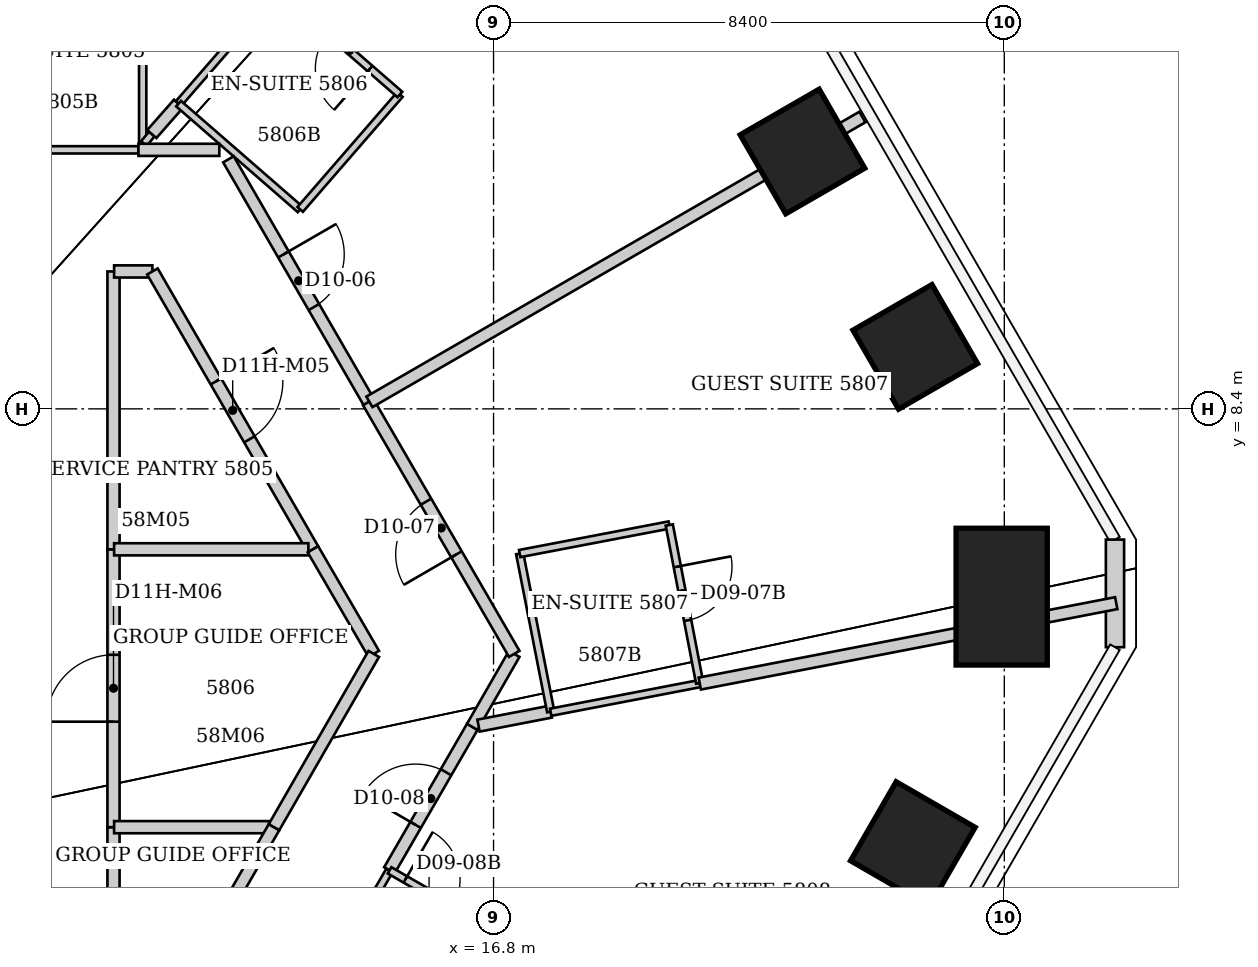
"""IFC4 building model, lengths in metres.
Left out: names, types, materials, properties, quantities, classifications, styles, units other than length and angle.
Written with IfcOpenShell. Run it as: python <this file> out.ifc"""

import sys

from ifc_helpers import new_model, si_unit, direction, frame, frame_2d, origin, origin_2d, place, context, subcontext, project, spatial, rectangle, extrude, element, fill, save


model = new_model("IFC4")
c1 = context("Model", 3, precision=1e-05, world=origin(), true_north=direction((0.0, 1.0)))
c2 = subcontext(c1, "Body", "Model", "MODEL_VIEW")
j1 = project(units=[si_unit("LENGTHUNIT", "METRE"), si_unit("PLANEANGLEUNIT", "RADIAN")], contexts=[c1])
p1 = place(None, origin())
s1 = spatial("IfcSite", under=j1, at=p1, CompositionType="ELEMENT")
p2 = place(p1, origin())
s2 = spatial("IfcBuilding", under=s1, at=p2, CompositionType="ELEMENT")
p3 = place(p2, frame((0.0, 0.0, 232.6)))
s3 = spatial("IfcBuildingStorey", under=s2, at=p3, CompositionType="ELEMENT", Elevation=232.6)
p4 = place(p3, frame((21.88, 12.633, -0.051), z_axis=(-0.059073478929, -0.034090583664, 0.99767136683), x_axis=(0.86410694155, 0.498665569053, 0.068204426596)))
e1 = element("IfcColumn", 1, at=p4, inside=s3, PredefinedType="COLUMN", context=c2, shape_type="SweptSolid", body=[
    extrude(rectangle(XDim=1.5, YDim=1.5, at=origin_2d()), origin(), (0.0, 0.0, 1.0), 3.86),
])
p5 = place(p3, frame((23.735, 9.419, -0.059), z_axis=(-0.064004664797, -0.025374630423, 0.997626949824), x_axis=(0.863841955807, 0.499136409128, 0.068116961699)))
e2 = element("IfcColumn", 2, at=p5, inside=s3, PredefinedType="COLUMN", context=c2, shape_type="SweptSolid", body=[
    extrude(rectangle(XDim=1.5, YDim=1.5, at=origin_2d()), origin(), (0.0, 0.0, 1.0), 3.868),
])
p6 = place(p3, frame((25.156, 5.311, -0.069), z_axis=(-0.069494626315, -0.014666891242, 0.997474500534), x_axis=(0.997582322762, -0.001100831088, 0.069485951703)))
e3 = element("IfcColumn", 3, at=p6, inside=s3, PredefinedType="COLUMN", context=c2, shape_type="SweptSolid", body=[
    extrude(rectangle(XDim=1.5, YDim=2.25, at=origin_2d()), origin(), (0.0, 0.0, 1.0), 3.878),
])
p7 = place(p3, frame((23.696, 1.242, -0.068), z_axis=(-0.064946488334, -0.003401658943, 0.997882950235), x_axis=(0.86374544839, -0.500971680077, 0.05450849609)))
e4 = element("IfcColumn", 4, at=p7, inside=s3, PredefinedType="COLUMN", context=c2, shape_type="SweptSolid", body=[
    extrude(rectangle(XDim=1.5, YDim=1.5, at=origin_2d()), origin(), (0.0, 0.0, 1.0), 3.876),
])
p8 = place(p3, frame((27.02, 6.25, 0.0), z_axis=(0.0, 0.0, 1.0), x_axis=(0.0, -1.0, 0.0)))
e5 = element("IfcWall", 5, at=p8, inside=s3, PredefinedType="SOLIDWALL", context=c2, shape_type="SweptSolid", body=[
    extrude(rectangle(XDim=1.77, YDim=0.3, at=frame_2d((0.885, 0.0))), origin(), (0.0, 0.0, 1.0), 3.64),
])
p9 = place(p3, frame((10.55, -2.855, 0.0), z_axis=(0.0, 0.0, 1.0), x_axis=(0.0, 1.0, 0.0)))
e6 = element("IfcWall", 6, at=p9, inside=s3, PredefinedType="PARTITIONING", context=c2, shape_type="SweptSolid", body=[
    extrude(rectangle(XDim=4.375, YDim=0.2, at=frame_2d((2.188, 0.0))), origin(), (0.0, 0.0, 1.0), 3.64),
])
p10 = place(p3, frame((10.55, 1.52, 0.0), z_axis=(0.0, 0.0, 1.0), x_axis=(0.0, 1.0, 0.0)))
e7 = element("IfcWall", 7, at=p10, inside=s3, PredefinedType="PARTITIONING", context=c2, shape_type="SweptSolid", body=[
    extrude(rectangle(XDim=4.57, YDim=0.2, at=frame_2d((2.285, 0.0))), origin(), (0.0, 0.0, 1.0), 3.64),
])
p11 = place(p10, frame((1.735, 0.0, 0.0)))
e8 = element("IfcOpeningElement", 8, at=p11, cuts=e7, PredefinedType="OPENING", context=c2, shape_type="SweptSolid", body=[
    extrude(rectangle(XDim=1.1, YDim=2.2, at=frame_2d((0.55, 1.1))), frame((0.0, 0.1, 0.0), z_axis=(0.0, -1.0, 0.0), x_axis=(1.0, 0.0, 0.0)), (0.0, 0.0, 1.0), 0.2),
])
p12 = place(p3, frame((10.55, 6.09, 0.0), z_axis=(0.0, 0.0, 1.0), x_axis=(0.0, 1.0, 0.0)))
e9 = element("IfcWall", 9, at=p12, inside=s3, PredefinedType="PARTITIONING", context=c2, shape_type="SweptSolid", body=[
    extrude(rectangle(XDim=4.57, YDim=0.2, at=frame_2d((2.285, 0.0))), origin(), (0.0, 0.0, 1.0), 3.64),
])
p13 = place(p3, frame((10.56, 1.52, 0.0), z_axis=(0.0, 0.0, 1.0), x_axis=(1.0, 0.0, 0.0)))
e10 = element("IfcWall", 10, at=p13, inside=s3, PredefinedType="PARTITIONING", context=c2, shape_type="SweptSolid", body=[
    extrude(rectangle(XDim=2.55, YDim=0.2, at=frame_2d((1.275, 0.0))), origin(), (0.0, 0.0, 1.0), 3.64),
])
p14 = place(p3, frame((10.56, 10.66, 0.0), z_axis=(0.0, 0.0, 1.0), x_axis=(1.0, 0.0, 0.0)))
e11 = element("IfcWall", 11, at=p14, inside=s3, PredefinedType="PARTITIONING", context=c2, shape_type="SweptSolid", body=[
    extrude(rectangle(XDim=0.63, YDim=0.2, at=frame_2d((0.315, 0.0))), origin(), (0.0, 0.0, 1.0), 3.64),
])
p15 = place(p3, frame((10.96, 12.66, 0.0), z_axis=(0.0, 0.0, 1.0), x_axis=(-1.0, 0.0, 0.0)))
e12 = element("IfcWall", 12, at=p15, inside=s3, PredefinedType="PARTITIONING", context=c2, shape_type="SweptSolid", body=[
    extrude(rectangle(XDim=2.43, YDim=0.12, at=frame_2d((1.215, 0.0))), origin(), (0.0, 0.0, 1.0), 3.64),
])
p16 = place(p3, frame((11.03, 12.74, 0.0), z_axis=(0.0, 0.0, 1.0), x_axis=(0.0, 1.0, 0.0)))
e13 = element("IfcWall", 13, at=p16, inside=s3, PredefinedType="PARTITIONING", context=c2, shape_type="SweptSolid", body=[
    extrude(rectangle(XDim=2.59, YDim=0.12, at=frame_2d((1.295, 0.0))), origin(), (0.0, 0.0, 1.0), 3.038),
])
p17 = place(p3, frame((11.049, 12.763, 0.0), z_axis=(0.0, 0.0, 1.0), x_axis=(0.639596257895, 0.768711016499, 0.0)))
e14 = element("IfcWall", 14, at=p17, inside=s3, PredefinedType="PARTITIONING", context=c2, shape_type="SweptSolid", body=[
    extrude(rectangle(XDim=0.204, YDim=0.12, at=frame_2d((0.102, 0.0))), origin(), (0.0, 0.0, 1.0), 3.64),
])
p18 = place(p3, frame((11.18, 12.92, 0.0), z_axis=(0.0, 0.0, 1.0), x_axis=(0.660578310858, 0.750757147967, 0.0)))
e15 = element("IfcWall", 15, at=p18, inside=s3, PredefinedType="PARTITIONING", context=c2, shape_type="SweptSolid", body=[
    extrude(rectangle(XDim=0.666, YDim=0.2, at=frame_2d((0.333, 0.0))), origin(), (0.0, 0.0, 1.0), 3.64),
])
p19 = place(p3, frame((11.19, 10.66, 0.0), z_axis=(0.0, 0.0, 1.0), x_axis=(0.500248310865, -0.865881993967, 0.0)))
e16 = element("IfcWall", 16, at=p19, inside=s3, PredefinedType="PARTITIONING", context=c2, shape_type="SweptSolid", body=[
    extrude(rectangle(XDim=5.278, YDim=0.2, at=frame_2d((2.639, 0.0))), origin(), (0.0, 0.0, 1.0), 3.64),
])
p20 = place(p19, frame((2.089, 0.0, 0.0)))
e17 = element("IfcOpeningElement", 17, at=p20, cuts=e16, PredefinedType="OPENING", context=c2, shape_type="SweptSolid", body=[
    extrude(rectangle(XDim=1.1, YDim=2.2, at=frame_2d((0.55, 1.1))), frame((0.0, 0.1, 0.0), z_axis=(0.0, -1.0, 0.0), x_axis=(1.0, 0.0, 0.0)), (0.0, 0.0, 1.0), 0.2),
])
p21 = place(p3, frame((11.62, 13.42, 0.0), z_axis=(0.0, 0.0, 1.0), x_axis=(0.655335308977, 0.755338091723, 0.0)))
e18 = element("IfcWall", 18, at=p21, inside=s3, PredefinedType="PARTITIONING", context=c2, shape_type="SweptSolid", body=[
    extrude(rectangle(XDim=2.502, YDim=0.12, at=frame_2d((1.251, 0.0))), origin(), (0.0, 0.0, 1.0), 3.64),
])
p22 = place(p3, frame((11.62, 13.42, 0.0), z_axis=(0.0, 0.0, 1.0), x_axis=(0.754444902764, -0.656363381591, 0.0)))
e19 = element("IfcWall", 19, at=p22, inside=s3, PredefinedType="PARTITIONING", context=c2, shape_type="SweptSolid", body=[
    extrude(rectangle(XDim=2.651, YDim=0.12, at=frame_2d((1.325, 0.0))), origin(), (0.0, 0.0, 1.0), 3.64),
])
p23 = place(p3, frame((12.29, 12.66, 0.0), z_axis=(0.0, 0.0, 1.0), x_axis=(-1.0, 0.0, 0.0)))
e20 = element("IfcWall", 20, at=p23, inside=s3, PredefinedType="PARTITIONING", context=c2, shape_type="SweptSolid", body=[
    extrude(rectangle(XDim=1.33, YDim=0.2, at=frame_2d((0.665, 0.0))), origin(), (0.0, 0.0, 1.0), 3.64),
])
p24 = place(p3, frame((12.44, 12.504, 0.0), z_axis=(0.0, 0.0, 1.0), x_axis=(0.500616963614, -0.865668906535, 0.0)))
e21 = element("IfcWall", 21, at=p24, inside=s3, PredefinedType="PARTITIONING", context=c2, shape_type="SweptSolid", body=[
    extrude(rectangle(XDim=4.614, YDim=0.2, at=frame_2d((2.307, 0.0))), origin(), (0.0, 0.0, 1.0), 3.64),
])
p25 = place(p24, frame((1.807, 0.0, 0.0)))
e22 = element("IfcOpeningElement", 22, at=p25, cuts=e21, PredefinedType="OPENING", context=c2, shape_type="SweptSolid", body=[
    extrude(rectangle(XDim=1.0, YDim=2.13, at=frame_2d((0.5, 1.065))), frame((0.0, 0.1, 0.0), z_axis=(0.0, -1.0, 0.0), x_axis=(1.0, 0.0, 0.0)), (0.0, 0.0, 1.0), 0.2),
])
p26 = place(p3, frame((13.19, 1.52, 0.0), z_axis=(0.0, 0.0, 1.0), x_axis=(-0.500193590286, -0.865913605527, 0.0)))
e23 = element("IfcWall", 23, at=p26, inside=s3, PredefinedType="PARTITIONING", context=c2, shape_type="SweptSolid", body=[
    extrude(rectangle(XDim=5.278, YDim=0.2, at=frame_2d((2.639, 0.0))), origin(), (0.0, 0.0, 1.0), 3.64),
])
p27 = place(p26, frame((1.9, 0.0, 0.0)))
e24 = element("IfcOpeningElement", 24, at=p27, cuts=e23, PredefinedType="OPENING", context=c2, shape_type="SweptSolid", body=[
    extrude(rectangle(XDim=1.1, YDim=2.2, at=frame_2d((0.55, 1.1))), frame((0.0, 0.1, 0.0), z_axis=(0.0, -1.0, 0.0), x_axis=(1.0, 0.0, 0.0)), (0.0, 0.0, 1.0), 0.2),
])
p28 = place(p3, frame((13.62, 11.68, 0.0), z_axis=(0.0, 0.0, 1.0), x_axis=(0.655335308977, 0.755338091723, 0.0)))
e25 = element("IfcWall", 25, at=p28, inside=s3, PredefinedType="PARTITIONING", context=c2, shape_type="SweptSolid", body=[
    extrude(rectangle(XDim=2.502, YDim=0.12, at=frame_2d((1.251, 0.0))), origin(), (0.0, 0.0, 1.0), 3.64),
])
p29 = place(p3, frame((13.755, 6.09, 0.0), z_axis=(0.0, 0.0, 1.0), x_axis=(-1.0, 0.0, 0.0)))
e26 = element("IfcWall", 26, at=p29, inside=s3, PredefinedType="PARTITIONING", context=c2, shape_type="SweptSolid", body=[
    extrude(rectangle(XDim=3.195, YDim=0.2, at=frame_2d((1.597, 0.0))), origin(), (0.0, 0.0, 1.0), 3.64),
])
p30 = place(p3, frame((13.83, 6.09, 0.0), z_axis=(0.0, 0.0, 1.0), x_axis=(0.502573539539, -0.864534462792, 0.0)))
e27 = element("IfcWall", 27, at=p30, inside=s3, PredefinedType="PARTITIONING", context=c2, shape_type="SweptSolid", body=[
    extrude(rectangle(XDim=1.99, YDim=0.2, at=frame_2d((0.995, 0.0))), origin(), (0.0, 0.0, 1.0), 3.64),
])
p31 = place(p3, frame((13.86, -1.31, 0.0), z_axis=(0.0, 0.0, 1.0), x_axis=(0.501813488763, 0.864975850817, 0.0)))
e28 = element("IfcWall", 28, at=p31, inside=s3, PredefinedType="PARTITIONING", context=c2, shape_type="SweptSolid", body=[
    extrude(rectangle(XDim=2.451, YDim=0.12, at=frame_2d((1.226, 0.0))), origin(), (0.0, 0.0, 1.0), 3.64),
])
p32 = place(p3, frame((14.83, 4.37, 0.0), z_axis=(0.0, 0.0, 1.0), x_axis=(-0.498775186059, -0.866731396554, 0.0)))
e29 = element("IfcWall", 29, at=p32, inside=s3, PredefinedType="PARTITIONING", context=c2, shape_type="SweptSolid", body=[
    extrude(rectangle(XDim=3.288, YDim=0.2, at=frame_2d((1.644, 0.0))), origin(), (0.0, 0.0, 1.0), 3.64),
])
p33 = place(p3, frame((15.088, 0.811, 0.0), z_axis=(0.0, 0.0, 1.0), x_axis=(0.500149166734, 0.8659392652, 0.0)))
e30 = element("IfcWall", 30, at=p33, inside=s3, PredefinedType="PARTITIONING", context=c2, shape_type="SweptSolid", body=[
    extrude(rectangle(XDim=2.724, YDim=0.2, at=frame_2d((1.362, 0.0))), origin(), (0.0, 0.0, 1.0), 3.64),
])
p34 = place(p33, frame((0.862, 0.0, 0.0)))
e31 = element("IfcOpeningElement", 31, at=p34, cuts=e30, PredefinedType="OPENING", context=c2, shape_type="SweptSolid", body=[
    extrude(rectangle(XDim=1.0, YDim=2.13, at=frame_2d((0.5, 1.065))), frame((0.0, 0.1, 0.0), z_axis=(0.0, -1.0, 0.0), x_axis=(1.0, 0.0, 0.0)), (0.0, 0.0, 1.0), 0.2),
])
p35 = place(p3, frame((15.26, 13.57, 0.0), z_axis=(0.0, 0.0, 1.0), x_axis=(-0.754444902764, 0.656363381591, 0.0)))
e32 = element("IfcWall", 32, at=p35, inside=s3, PredefinedType="PARTITIONING", context=c2, shape_type="SweptSolid", body=[
    extrude(rectangle(XDim=2.651, YDim=0.12, at=frame_2d((1.325, 0.0))), origin(), (0.0, 0.0, 1.0), 3.64),
])
p36 = place(p35, frame((0.65, 0.0, 0.0)))
e33 = element("IfcOpeningElement", 33, at=p36, cuts=e32, PredefinedType="OPENING", context=c2, shape_type="SweptSolid", body=[
    extrude(rectangle(XDim=0.9, YDim=2.03, at=frame_2d((0.45, 1.015))), frame((0.0, 0.06, 0.0), z_axis=(0.0, -1.0, 0.0), x_axis=(1.0, 0.0, 0.0)), (0.0, 0.0, 1.0), 0.12),
])
p37 = place(p3, frame((16.45, 3.17, 0.0), z_axis=(0.0, 0.0, 1.0), x_axis=(0.49845455473, 0.866915830325, 0.0)))
e34 = element("IfcWall", 34, at=p37, inside=s3, PredefinedType="PARTITIONING", context=c2, shape_type="SweptSolid", body=[
    extrude(rectangle(XDim=1.384, YDim=0.2, at=frame_2d((0.692, 0.0))), origin(), (0.0, 0.0, 1.0), 3.64),
])
p38 = place(p3, frame((16.553, 3.19, 0.0), z_axis=(0.0, 0.0, 1.0), x_axis=(0.981743377248, 0.19021025532, 0.0)))
e35 = element("IfcWall", 35, at=p38, inside=s3, PredefinedType="PARTITIONING", context=c2, shape_type="SweptSolid", body=[
    extrude(rectangle(XDim=1.209, YDim=0.2, at=frame_2d((0.604, 0.0))), origin(), (0.0, 0.0, 1.0), 3.64),
])
p39 = place(p3, frame((17.14, 4.37, 0.0), z_axis=(0.0, 0.0, 1.0), x_axis=(-0.501524901322, 0.865143209737, 0.0)))
e36 = element("IfcWall", 36, at=p39, inside=s3, PredefinedType="PARTITIONING", context=c2, shape_type="SweptSolid", body=[
    extrude(rectangle(XDim=4.785, YDim=0.2, at=frame_2d((2.393, 0.0))), origin(), (0.0, 0.0, 1.0), 3.64),
])
p40 = place(p39, frame((1.893, 0.0, 0.0)))
e37 = element("IfcOpeningElement", 37, at=p40, cuts=e36, PredefinedType="OPENING", context=c2, shape_type="SweptSolid", body=[
    extrude(rectangle(XDim=1.0, YDim=2.13, at=frame_2d((0.5, 1.065))), frame((0.0, 0.1, 0.0), z_axis=(0.0, -1.0, 0.0), x_axis=(1.0, 0.0, 0.0)), (0.0, 0.0, 1.0), 0.2),
])
p41 = place(p3, frame((17.23, 6.02, 0.0), z_axis=(0.0, 0.0, 1.0), x_axis=(0.192499717639, -0.981297028788, 0.0)))
e38 = element("IfcWall", 38, at=p41, inside=s3, PredefinedType="PARTITIONING", context=c2, shape_type="SweptSolid", body=[
    extrude(rectangle(XDim=2.649, YDim=0.12, at=frame_2d((1.325, 0.0))), origin(), (0.0, 0.0, 1.0), 3.64),
])
p42 = place(p3, frame((17.4, -0.52, 0.0), z_axis=(0.0, 0.0, 1.0), x_axis=(-0.866592449628, 0.499016559092, 0.0)))
e39 = element("IfcWall", 39, at=p42, inside=s3, PredefinedType="PARTITIONING", context=c2, shape_type="SweptSolid", body=[
    extrude(rectangle(XDim=2.665, YDim=0.12, at=frame_2d((1.333, 0.0))), origin(), (0.0, 0.0, 1.0), 3.64),
])
p43 = place(p42, frame((1.466, 0.0, 0.0)))
e40 = element("IfcOpeningElement", 40, at=p43, cuts=e39, PredefinedType="OPENING", context=c2, shape_type="SweptSolid", body=[
    extrude(rectangle(XDim=0.9, YDim=2.03, at=frame_2d((0.45, 1.015))), frame((0.0, 0.06, 0.0), z_axis=(0.0, -1.0, 0.0), x_axis=(1.0, 0.0, 0.0)), (0.0, 0.0, 1.0), 0.12),
])
p44 = place(p3, frame((17.74, 3.41, 0.0), z_axis=(0.0, 0.0, 1.0), x_axis=(0.981991098912, 0.188927186128, 0.0)))
e41 = element("IfcWall", 41, at=p44, inside=s3, PredefinedType="PARTITIONING", context=c2, shape_type="SweptSolid", body=[
    extrude(rectangle(XDim=2.497, YDim=0.12, at=frame_2d((1.248, 0.0))), origin(), (0.0, 0.0, 1.0), 3.64),
])
p45 = place(p3, frame((19.69, 6.49, 0.0), z_axis=(0.0, 0.0, 1.0), x_axis=(-0.98223517487, -0.187654100002, 0.0)))
e42 = element("IfcWall", 42, at=p45, inside=s3, PredefinedType="PARTITIONING", context=c2, shape_type="SweptSolid", body=[
    extrude(rectangle(XDim=2.504, YDim=0.12, at=frame_2d((1.252, 0.0))), origin(), (0.0, 0.0, 1.0), 3.64),
])
p46 = place(p3, frame((20.19, 3.89, 0.0), z_axis=(0.0, 0.0, 1.0), x_axis=(-0.188840553732, 0.982007762325, 0.0)))
e43 = element("IfcWall", 43, at=p46, inside=s3, PredefinedType="PARTITIONING", context=c2, shape_type="SweptSolid", body=[
    extrude(rectangle(XDim=2.648, YDim=0.12, at=frame_2d((1.324, 0.0))), origin(), (0.0, 0.0, 1.0), 3.64),
])
p47 = place(p46, frame((1.05, 0.0, 0.0)))
e44 = element("IfcOpeningElement", 44, at=p47, cuts=e43, PredefinedType="OPENING", context=c2, shape_type="SweptSolid", body=[
    extrude(rectangle(XDim=0.9, YDim=2.03, at=frame_2d((0.45, 1.015))), frame((0.0, 0.06, 0.0), z_axis=(0.0, -1.0, 0.0), x_axis=(1.0, 0.0, 0.0)), (0.0, 0.0, 1.0), 0.12),
])
p48 = place(p3, frame((20.192, 3.882, 0.0), z_axis=(0.0, 0.0, 1.0), x_axis=(0.981855599951, 0.189630115871, 0.0)))
e45 = element("IfcWall", 45, at=p48, inside=s3, PredefinedType="PARTITIONING", context=c2, shape_type="SweptSolid", body=[
    extrude(rectangle(XDim=6.975, YDim=0.2, at=frame_2d((3.488, 0.0))), origin(), (0.0, 0.0, 1.0), 3.64),
])
p49 = place(p3, frame((22.866, 13.2, 0.0), z_axis=(0.0, 0.0, 1.0), x_axis=(-0.865840726882, -0.500319733442, 0.0)))
e46 = element("IfcWall", 46, at=p49, inside=s3, PredefinedType="PARTITIONING", context=c2, shape_type="SweptSolid", body=[
    extrude(rectangle(XDim=9.364, YDim=0.2, at=frame_2d((4.682, 0.0))), origin(), (0.0, 0.0, 1.0), 2.878),
])
p50 = place(p25, origin())
e47 = element("IfcDoor", 47, at=p50, inside=s3, OperationType="SINGLE_SWING_LEFT", PredefinedType="DOOR", context=c2, shape_type="SweptSolid", body=[
    extrude(rectangle(XDim=1.0, YDim=2.13, at=frame_2d((0.5, 1.065))), frame((0.0, 0.025, 0.0), z_axis=(0.0, -1.0, 0.0), x_axis=(1.0, 0.0, 0.0)), (0.0, 0.0, 1.0), 0.05),
])
fill(e22, e47)
p51 = place(p36, origin())
e48 = element("IfcDoor", 48, at=p51, inside=s3, OperationType="SINGLE_SWING_LEFT", PredefinedType="DOOR", context=c2, shape_type="SweptSolid", body=[
    extrude(rectangle(XDim=0.9, YDim=2.03, at=frame_2d((0.45, 1.015))), frame((0.0, 0.025, 0.0), z_axis=(0.0, -1.0, 0.0), x_axis=(1.0, 0.0, 0.0)), (0.0, 0.0, 1.0), 0.05),
])
fill(e33, e48)
p52 = place(p40, origin())
e49 = element("IfcDoor", 49, at=p52, inside=s3, OperationType="SINGLE_SWING_LEFT", PredefinedType="DOOR", context=c2, shape_type="SweptSolid", body=[
    extrude(rectangle(XDim=1.0, YDim=2.13, at=frame_2d((0.5, 1.065))), frame((0.0, 0.025, 0.0), z_axis=(0.0, -1.0, 0.0), x_axis=(1.0, 0.0, 0.0)), (0.0, 0.0, 1.0), 0.05),
])
fill(e37, e49)
p53 = place(p47, origin())
e50 = element("IfcDoor", 50, at=p53, inside=s3, OperationType="SINGLE_SWING_RIGHT", PredefinedType="DOOR", context=c2, shape_type="SweptSolid", body=[
    extrude(rectangle(XDim=0.9, YDim=2.03, at=frame_2d((0.45, 1.015))), frame((0.0, 0.025, 0.0), z_axis=(0.0, -1.0, 0.0), x_axis=(1.0, 0.0, 0.0)), (0.0, 0.0, 1.0), 0.05),
])
fill(e44, e50)
p54 = place(p34, origin())
e51 = element("IfcDoor", 51, at=p54, inside=s3, OperationType="SINGLE_SWING_LEFT", PredefinedType="DOOR", context=c2, shape_type="SweptSolid", body=[
    extrude(rectangle(XDim=1.0, YDim=2.13, at=frame_2d((0.5, 1.065))), frame((0.0, 0.025, 0.0), z_axis=(0.0, -1.0, 0.0), x_axis=(1.0, 0.0, 0.0)), (0.0, 0.0, 1.0), 0.05),
])
fill(e31, e51)
p55 = place(p43, origin())
e52 = element("IfcDoor", 52, at=p55, inside=s3, OperationType="SINGLE_SWING_RIGHT", PredefinedType="DOOR", context=c2, shape_type="SweptSolid", body=[
    extrude(rectangle(XDim=0.9, YDim=2.03, at=frame_2d((0.45, 1.015))), frame((0.0, 0.025, 0.0), z_axis=(0.0, -1.0, 0.0), x_axis=(1.0, 0.0, 0.0)), (0.0, 0.0, 1.0), 0.05),
])
fill(e40, e52)
p56 = place(p20, origin())
e53 = element("IfcDoor", 53, at=p56, inside=s3, OperationType="SINGLE_SWING_LEFT", PredefinedType="DOOR", context=c2, shape_type="SweptSolid", body=[
    extrude(rectangle(XDim=1.1, YDim=2.2, at=frame_2d((0.55, 1.1))), frame((0.0, 0.025, 0.0), z_axis=(0.0, -1.0, 0.0), x_axis=(1.0, 0.0, 0.0)), (0.0, 0.0, 1.0), 0.05),
])
fill(e17, e53)
p57 = place(p11, origin())
e54 = element("IfcDoor", 54, at=p57, inside=s3, OperationType="SINGLE_SWING_LEFT", PredefinedType="DOOR", context=c2, shape_type="SweptSolid", body=[
    extrude(rectangle(XDim=1.1, YDim=2.2, at=frame_2d((0.55, 1.1))), frame((0.0, 0.025, 0.0), z_axis=(0.0, -1.0, 0.0), x_axis=(1.0, 0.0, 0.0)), (0.0, 0.0, 1.0), 0.05),
])
fill(e8, e54)
save(model, sys.argv[1])
